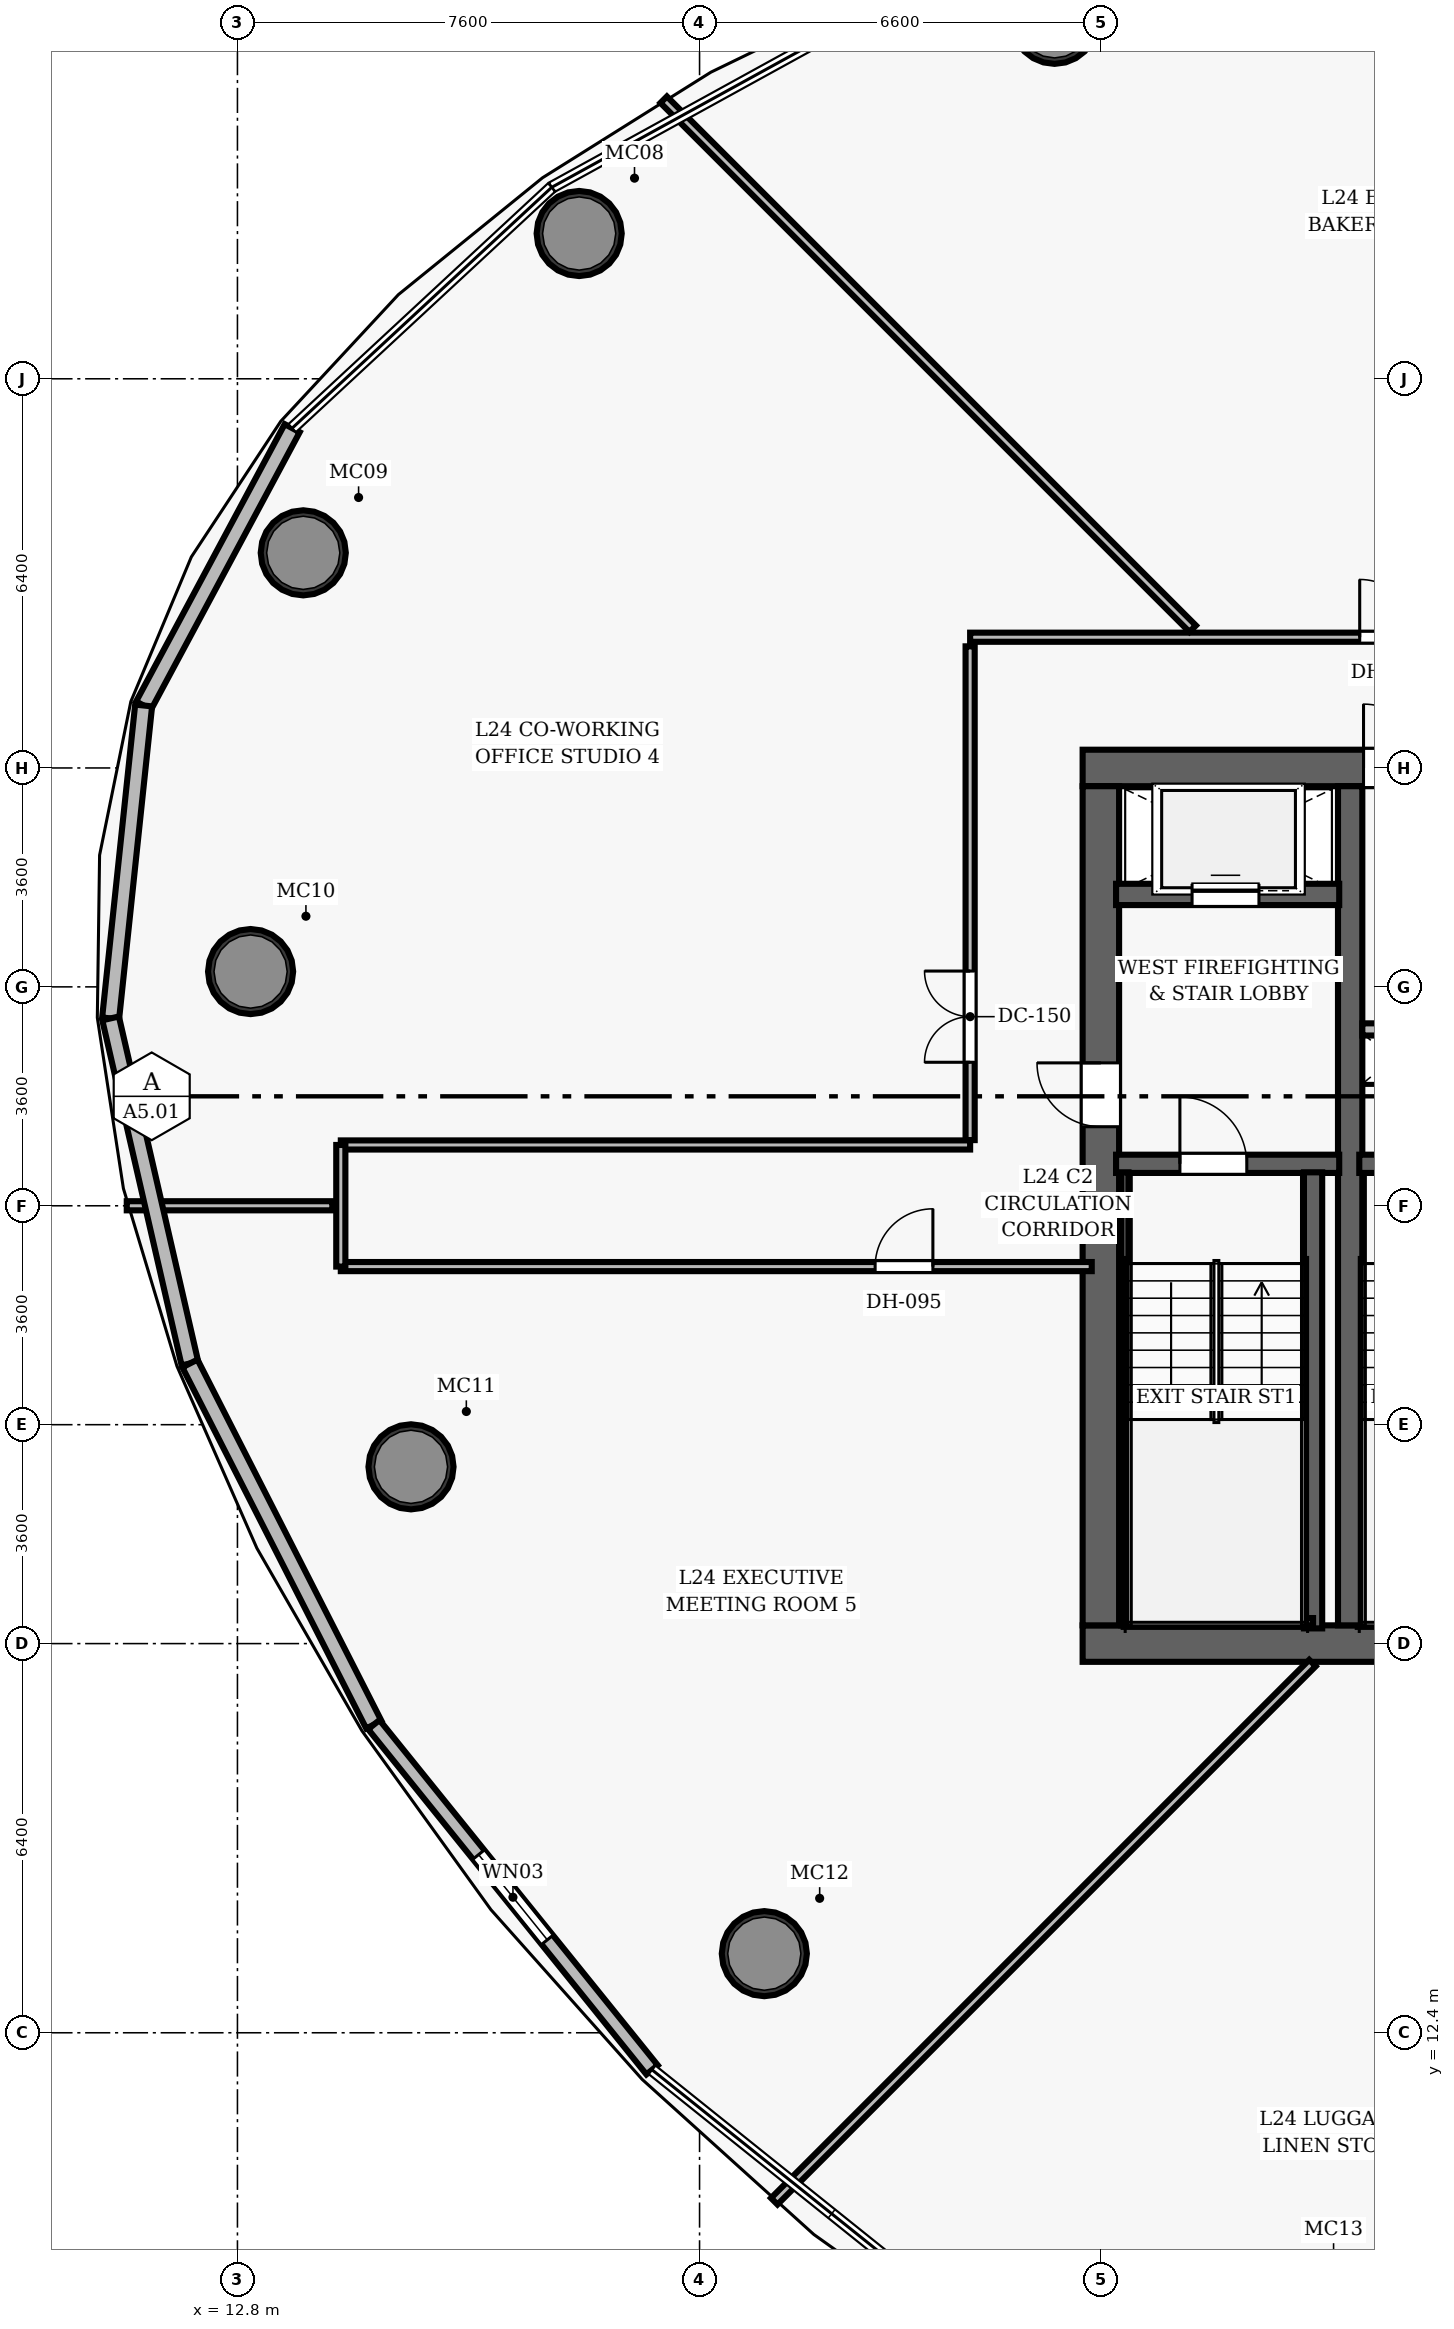
"""IFC4 building model, lengths in metres.
Left out: names, types, materials, properties, quantities, classifications, styles, units other than length and angle.
Written with IfcOpenShell. Run it as: python <this file> out.ifc"""

import sys

from ifc_helpers import new_model, si_unit, direction, frame, frame_2d, origin, origin_2d, place, context, subcontext, project, spatial, rectangle, hollow_circle, extrude, element, fill, save


model = new_model("IFC4")
c1 = context("Model", 3, precision=1e-05, world=origin(), true_north=direction((0.0, 1.0)))
c2 = subcontext(c1, "Body", "Model", "MODEL_VIEW")
j1 = project(units=[si_unit("LENGTHUNIT", "METRE"), si_unit("PLANEANGLEUNIT", "RADIAN")], contexts=[c1])
p1 = place(None, origin())
s1 = spatial("IfcSite", under=j1, at=p1, CompositionType="ELEMENT")
p2 = place(p1, origin())
s2 = spatial("IfcBuilding", under=s1, at=p2, CompositionType="ELEMENT")
p3 = place(p2, frame((0.0, 0.0, 102.8)))
s3 = spatial("IfcBuildingStorey", under=s2, at=p3, CompositionType="ELEMENT", Elevation=102.8)
p4 = place(p3, frame((26.7, 18.8, 0.0), z_axis=(0.0, 0.0, 1.0), x_axis=(1.0, 0.0, 0.0)))
e1 = element("IfcWall", 1, at=p4, inside=s3, PredefinedType="SHEAR", context=c2, shape_type="SweptSolid", body=[
    extrude(rectangle(XDim=22.6, YDim=0.6, at=frame_2d((11.3, 0.0))), origin(), (0.0, 0.0, 1.0), 3.5),
])
p5 = place(p4, frame((14.52, 0.0, 0.0)))
e2 = element("IfcOpeningElement", 2, at=p5, cuts=e1, PredefinedType="OPENING", context=c2, shape_type="SweptSolid", body=[
    extrude(rectangle(XDim=1.05, YDim=2.15, at=frame_2d((0.525, 1.075))), frame((0.0, 0.31, 0.0), z_axis=(0.0, -1.0, 0.0), x_axis=(1.0, 0.0, 0.0)), (0.0, 0.0, 1.0), 0.62),
])
p6 = place(p3, frame((26.7, 33.2, 0.0), z_axis=(0.0, 0.0, 1.0), x_axis=(1.0, 0.0, 0.0)))
e3 = element("IfcWall", 3, at=p6, inside=s3, PredefinedType="SHEAR", context=c2, shape_type="SweptSolid", body=[
    extrude(rectangle(XDim=22.6, YDim=0.6, at=frame_2d((11.3, 0.0))), origin(), (0.0, 0.0, 1.0), 3.5),
])
p7 = place(p6, frame((4.62, 0.0, 0.0)))
e4 = element("IfcOpeningElement", 4, at=p7, cuts=e3, PredefinedType="OPENING", context=c2, shape_type="SweptSolid", body=[
    extrude(rectangle(XDim=1.05, YDim=2.15, at=frame_2d((0.525, 1.075))), frame((0.0, 0.31, 0.0), z_axis=(0.0, -1.0, 0.0), x_axis=(1.0, 0.0, 0.0)), (0.0, 0.0, 1.0), 0.62),
])
p8 = place(p6, frame((14.52, 0.0, 0.0)))
e5 = element("IfcOpeningElement", 5, at=p8, cuts=e3, PredefinedType="OPENING", context=c2, shape_type="SweptSolid", body=[
    extrude(rectangle(XDim=1.05, YDim=2.15, at=frame_2d((0.525, 1.075))), frame((0.0, 0.31, 0.0), z_axis=(0.0, -1.0, 0.0), x_axis=(1.0, 0.0, 0.0)), (0.0, 0.0, 1.0), 0.62),
])
p9 = place(p3, frame((27.0, 19.1, 0.0), z_axis=(0.0, 0.0, 1.0), x_axis=(0.0, 1.0, 0.0)))
e6 = element("IfcWall", 6, at=p9, inside=s3, PredefinedType="SHEAR", context=c2, shape_type="SweptSolid", body=[
    extrude(rectangle(XDim=13.8, YDim=0.6, at=frame_2d((6.9, 0.0))), origin(), (0.0, 0.0, 1.0), 3.5),
])
p10 = place(p9, frame((8.2, 0.0, 0.0)))
e7 = element("IfcOpeningElement", 7, at=p10, cuts=e6, PredefinedType="OPENING", context=c2, shape_type="SweptSolid", body=[
    extrude(rectangle(XDim=1.05, YDim=2.15, at=frame_2d((0.525, 1.075))), frame((0.0, 0.31, 0.0), z_axis=(0.0, -1.0, 0.0), x_axis=(1.0, 0.0, 0.0)), (0.0, 0.0, 1.0), 0.62),
])
p11 = place(p3, frame((31.1, 19.1, 0.0), z_axis=(0.0, 0.0, 1.0), x_axis=(0.0, 1.0, 0.0)))
e8 = element("IfcWall", 8, at=p11, inside=s3, PredefinedType="SHEAR", context=c2, shape_type="SweptSolid", body=[
    extrude(rectangle(XDim=13.8, YDim=0.4, at=frame_2d((6.9, 0.0))), origin(), (0.0, 0.0, 1.0), 3.5),
])
for number, where, z_axis, x_axis in (
    (9, (26.238, 45.479, 0.0), (0.0, 0.0, 1.0), (1.0, 0.0, 0.0)),
    (10, (18.42, 41.989, 0.0), (0.0, 0.0, 1.0), (1.0, 0.0, 0.0)),
    (11, (13.882, 36.738, 0.0), (0.0, 0.0, 1.0), (1.0, 0.0, 0.0)),
    (12, (13.016, 29.852, 0.0), (0.0, 0.0, 1.0), (1.0, 0.0, 0.0)),
    (13, (15.654, 21.707, 0.0), (0.0, 0.0, 1.0), (1.0, 0.0, 0.0)),
    (14, (21.465, 13.701, 0.0), (0.0, 0.0, 1.0), (1.0, 0.0, 0.0)),
):
    element("IfcColumn", number, at=place(p3, frame(where, z_axis=z_axis, x_axis=x_axis)), inside=s3, PredefinedType="COLUMN", context=c2, shape_type="SweptSolid", body=[
        extrude(hollow_circle(Radius=0.7, WallThickness=0.055, at=origin_2d()), origin(), (0.0, 0.0, 1.0), 3.5),
    ])
p12 = place(p3, frame((27.25, 26.69, 0.0), z_axis=(0.0, 0.0, 1.0), x_axis=(1.0, 0.0, 0.0)))
e15 = element("IfcWall", 15, at=p12, inside=s3, PredefinedType="SHEAR", context=c2, shape_type="SweptSolid", body=[
    extrude(rectangle(XDim=3.67, YDim=0.3, at=frame_2d((1.835, 0.0))), origin(), (0.0, 0.0, 1.0), 3.5),
])
p13 = place(p12, frame((1.05, 0.0, 0.0)))
e16 = element("IfcOpeningElement", 16, at=p13, cuts=e15, PredefinedType="OPENING", context=c2, shape_type="SweptSolid", body=[
    extrude(rectangle(XDim=1.1, YDim=2.15, at=frame_2d((0.55, 1.075))), frame((0.0, 0.16, 0.0), z_axis=(0.0, -1.0, 0.0), x_axis=(1.0, 0.0, 0.0)), (0.0, 0.0, 1.0), 0.32),
])
p14 = place(p3, frame((30.49, 19.05, 0.0), z_axis=(0.0, 0.0, 1.0), x_axis=(0.0, 1.0, 0.0)))
e17 = element("IfcWall", 17, at=p14, inside=s3, PredefinedType="SHEAR", context=c2, shape_type="SweptSolid", body=[
    extrude(rectangle(XDim=7.5, YDim=0.3, at=frame_2d((3.75, 0.0))), origin(), (0.0, 0.0, 1.0), 3.5),
])
p15 = place(p3, frame((27.395, 19.1, 0.0), z_axis=(0.0, 0.0, 1.0), x_axis=(0.0, 1.0, 0.0)))
e18 = element("IfcWall", 18, at=p15, inside=s3, PredefinedType="SHEAR", context=c2, shape_type="SweptSolid", body=[
    extrude(rectangle(XDim=7.45, YDim=0.12, at=frame_2d((3.725, 0.0))), origin(), (0.0, 0.0, 1.0), 3.5),
])
p16 = place(p3, frame((27.395, 19.16, 0.0), z_axis=(0.0, 0.0, 1.0), x_axis=(1.0, 0.0, 0.0)))
e19 = element("IfcWall", 19, at=p16, inside=s3, PredefinedType="SHEAR", context=c2, shape_type="SweptSolid", body=[
    extrude(rectangle(XDim=3.095, YDim=0.12, at=frame_2d((1.547, 0.0))), origin(), (0.0, 0.0, 1.0), 3.5),
])
p17 = place(p3, frame((27.25, 31.12, 0.0), z_axis=(0.0, 0.0, 1.0), x_axis=(1.0, 0.0, 0.0)))
e20 = element("IfcWall", 20, at=p17, inside=s3, PredefinedType="SHEAR", context=c2, shape_type="SweptSolid", body=[
    extrude(rectangle(XDim=3.67, YDim=0.35, at=frame_2d((1.835, 0.0))), origin(), (0.0, 0.0, 1.0), 2.675),
])
p18 = place(p17, frame((1.25, 0.0, 0.0)))
e21 = element("IfcOpeningElement", 21, at=p18, cuts=e20, PredefinedType="OPENING", context=c2, shape_type="SweptSolid", body=[
    extrude(rectangle(XDim=1.1, YDim=2.15, at=frame_2d((0.55, 1.075))), frame((0.0, 0.185, 0.0), z_axis=(0.0, -1.0, 0.0), x_axis=(1.0, 0.0, 0.0)), (0.0, 0.0, 1.0), 0.37),
])
p19 = place(p3, frame((31.25, 26.69, 0.0), z_axis=(0.0, 0.0, 1.0), x_axis=(1.0, 0.0, 0.0)))
e22 = element("IfcWall", 22, at=p19, inside=s3, PredefinedType="SHEAR", context=c2, shape_type="SweptSolid", body=[
    extrude(rectangle(XDim=3.56, YDim=0.3, at=frame_2d((1.78, 0.0))), origin(), (0.0, 0.0, 1.0), 3.5),
])
p20 = place(p19, frame((1.55, 0.0, 0.0)))
e23 = element("IfcOpeningElement", 23, at=p20, cuts=e22, PredefinedType="OPENING", context=c2, shape_type="SweptSolid", body=[
    extrude(rectangle(XDim=1.1, YDim=2.15, at=frame_2d((0.55, 1.075))), frame((0.0, 0.16, 0.0), z_axis=(0.0, -1.0, 0.0), x_axis=(1.0, 0.0, 0.0)), (0.0, 0.0, 1.0), 0.32),
])
p21 = place(p3, frame((31.3, 19.16, 0.0), z_axis=(0.0, 0.0, 1.0), x_axis=(1.0, 0.0, 0.0)))
e24 = element("IfcWall", 24, at=p21, inside=s3, PredefinedType="SHEAR", context=c2, shape_type="SweptSolid", body=[
    extrude(rectangle(XDim=3.04, YDim=0.12, at=frame_2d((1.52, 0.0))), origin(), (0.0, 0.0, 1.0), 3.5),
])
p22 = place(p3, frame((31.3, 28.9, 0.0), z_axis=(0.0, 0.0, 1.0), x_axis=(1.0, 0.0, 0.0)))
e25 = element("IfcWall", 25, at=p22, inside=s3, PredefinedType="PARTITIONING", context=c2, shape_type="SweptSolid", body=[
    extrude(rectangle(XDim=1.12, YDim=0.2, at=frame_2d((0.56, 0.0))), origin(), (0.0, 0.0, 1.0), 2.675),
])
p23 = place(p3, frame((24.85, 35.35, 0.0), z_axis=(0.0, 0.0, 1.0), x_axis=(1.0, 0.0, 0.0)))
e26 = element("IfcWall", 26, at=p23, inside=s3, PredefinedType="PARTITIONING", context=c2, shape_type="SweptSolid", body=[
    extrude(rectangle(XDim=26.0, YDim=0.15, at=frame_2d((13.0, 0.0))), origin(), (0.0, 0.0, 1.0), 2.675),
])
p24 = place(p23, frame((14.628, 0.0, 0.0)))
e27 = element("IfcOpeningElement", 27, at=p24, cuts=e26, PredefinedType="OPENING", context=c2, shape_type="SweptSolid", body=[
    extrude(rectangle(XDim=1.5, YDim=2.2, at=frame_2d((0.75, 1.1))), frame((0.0, 0.085, 0.0), z_axis=(0.0, -1.0, 0.0), x_axis=(1.0, 0.0, 0.0)), (0.0, 0.0, 1.0), 0.17),
])
p25 = place(p23, frame((6.407, 0.0, 0.0)))
e28 = element("IfcOpeningElement", 28, at=p25, cuts=e26, PredefinedType="OPENING", context=c2, shape_type="SweptSolid", body=[
    extrude(rectangle(XDim=0.95, YDim=2.15, at=frame_2d((0.475, 1.075))), frame((0.0, 0.085, 0.0), z_axis=(0.0, -1.0, 0.0), x_axis=(1.0, 0.0, 0.0)), (0.0, 0.0, 1.0), 0.17),
])
p26 = place(p3, frame((24.85, 27.08, 0.0), z_axis=(0.0, 0.0, 1.0), x_axis=(0.0, 1.0, 0.0)))
e29 = element("IfcWall", 29, at=p26, inside=s3, PredefinedType="PARTITIONING", context=c2, shape_type="SweptSolid", body=[
    extrude(rectangle(XDim=8.12, YDim=0.15, at=frame_2d((4.06, 0.0))), origin(), (0.0, 0.0, 1.0), 2.675),
])
p27 = place(p26, frame((1.28, 0.0, 0.0)))
e30 = element("IfcOpeningElement", 30, at=p27, cuts=e29, PredefinedType="OPENING", context=c2, shape_type="SweptSolid", body=[
    extrude(rectangle(XDim=1.5, YDim=2.2, at=frame_2d((0.75, 1.1))), frame((0.0, 0.085, 0.0), z_axis=(0.0, -1.0, 0.0), x_axis=(1.0, 0.0, 0.0)), (0.0, 0.0, 1.0), 0.17),
])
p28 = place(p3, frame((14.5, 27.0, 0.0), z_axis=(0.0, 0.0, 1.0), x_axis=(1.0, 0.0, 0.0)))
e31 = element("IfcWall", 31, at=p28, inside=s3, PredefinedType="PARTITIONING", context=c2, shape_type="SweptSolid", body=[
    extrude(rectangle(XDim=10.35, YDim=0.15, at=frame_2d((5.175, 0.0))), origin(), (0.0, 0.0, 1.0), 2.675),
])
p29 = place(p3, frame((14.5, 25.0, 0.0), z_axis=(0.0, 0.0, 1.0), x_axis=(1.0, 0.0, 0.0)))
e32 = element("IfcWall", 32, at=p29, inside=s3, PredefinedType="PARTITIONING", context=c2, shape_type="SweptSolid", body=[
    extrude(rectangle(XDim=12.35, YDim=0.15, at=frame_2d((6.175, 0.0))), origin(), (0.0, 0.0, 1.0), 2.675),
])
p30 = place(p29, frame((8.788, 0.0, 0.0)))
e33 = element("IfcOpeningElement", 33, at=p30, cuts=e32, PredefinedType="OPENING", context=c2, shape_type="SweptSolid", body=[
    extrude(rectangle(XDim=0.95, YDim=2.15, at=frame_2d((0.475, 1.075))), frame((0.0, 0.085, 0.0), z_axis=(0.0, -1.0, 0.0), x_axis=(1.0, 0.0, 0.0)), (0.0, 0.0, 1.0), 0.17),
])
p31 = place(p3, frame((14.5, 25.0, 0.0), z_axis=(0.0, 0.0, 1.0), x_axis=(0.0, 1.0, 0.0)))
e34 = element("IfcWall", 34, at=p31, inside=s3, PredefinedType="PARTITIONING", context=c2, shape_type="SweptSolid", body=[
    extrude(rectangle(XDim=2.0, YDim=0.15, at=frame_2d((1.0, 0.0))), origin(), (0.0, 0.0, 1.0), 2.675),
])
p32 = place(p3, frame((28.51, 35.49, 0.0), z_axis=(0.0, 0.0, 1.0), x_axis=(-0.707106781187, 0.707106781187, 0.0)))
e35 = element("IfcWall", 35, at=p32, inside=s3, PredefinedType="PARTITIONING", context=c2, shape_type="SweptSolid", body=[
    extrude(rectangle(XDim=12.304, YDim=0.15, at=frame_2d((6.152, 0.0))), origin(), (0.0, 0.0, 1.0), 2.675),
])
p33 = place(p3, frame((14.36, 26.0, 0.0), z_axis=(0.0, 0.0, 1.0), x_axis=(-1.0, 0.0, 0.0)))
e36 = element("IfcWall", 36, at=p33, inside=s3, PredefinedType="PARTITIONING", context=c2, shape_type="SweptSolid", body=[
    extrude(rectangle(XDim=3.381, YDim=0.15, at=frame_2d((1.69, 0.0))), origin(), (0.0, 0.0, 1.0), 2.675),
])
p34 = place(p3, frame((30.48, 18.48, 0.0), z_axis=(0.0, 0.0, 1.0), x_axis=(-0.707106781187, -0.707106781187, 0.0)))
e37 = element("IfcWall", 37, at=p34, inside=s3, PredefinedType="PARTITIONING", context=c2, shape_type="SweptSolid", body=[
    extrude(rectangle(XDim=12.518, YDim=0.15, at=frame_2d((6.259, 0.0))), origin(), (0.0, 0.0, 1.0), 2.675),
])
for number, where, z_axis, x_axis in (
    (38, (11.257, 34.227, 0.0), (0.0, 0.0, 1.0), (0.472, 0.881, 0.0)),
    (39, (10.714, 29.082, 0.0), (0.0, 0.0, 1.0), (0.105, 0.994, 0.0)),
):
    element("IfcWall", number, at=place(p3, frame(where, z_axis=z_axis, x_axis=x_axis)), inside=s3, PredefinedType="SOLIDWALL", context=c2, shape_type="SweptSolid", body=[
        extrude(rectangle(XDim=5.174, YDim=0.28, at=frame_2d((2.587, 0.0))), origin(), (0.0, 0.0, 1.0), 3.26),
    ])
p35 = place(p3, frame((12.018, 23.406, 0.0), z_axis=(0.0, 0.0, 1.0), x_axis=(-0.223974469887, 0.974595011704, 0.0)))
e40 = element("IfcWall", 40, at=p35, inside=s3, PredefinedType="SOLIDWALL", context=c2, shape_type="SweptSolid", body=[
    extrude(rectangle(XDim=5.823, YDim=0.28, at=frame_2d((2.912, 0.0))), origin(), (0.0, 0.0, 1.0), 3.26),
])
p36 = place(p3, frame((15.043, 17.467, 0.0), z_axis=(0.0, 0.0, 1.0), x_axis=(-0.45378036064, 0.891113564198, 0.0)))
e41 = element("IfcWall", 41, at=p36, inside=s3, PredefinedType="SOLIDWALL", context=c2, shape_type="SweptSolid", body=[
    extrude(rectangle(XDim=6.665, YDim=0.28, at=frame_2d((3.333, 0.0))), origin(), (0.0, 0.0, 1.0), 3.26),
])
p37 = place(p3, frame((19.619, 11.791, 0.0), z_axis=(0.0, 0.0, 1.0), x_axis=(-0.627638574616, 0.778504861676, 0.0)))
e42 = element("IfcWall", 42, at=p37, inside=s3, PredefinedType="SOLIDWALL", context=c2, shape_type="SweptSolid", body=[
    extrude(rectangle(XDim=7.292, YDim=0.24, at=frame_2d((3.646, 0.0))), origin(), (0.0, 0.0, 1.0), 3.26),
])
p38 = place(p37, frame((2.746, 0.0, 0.85)))
e43 = element("IfcOpeningElement", 43, at=p38, cuts=e42, PredefinedType="OPENING", context=c2, shape_type="SweptSolid", body=[
    extrude(rectangle(XDim=1.8, YDim=1.8, at=frame_2d((0.9, 0.9))), frame((0.0, 0.13, 0.0), z_axis=(0.0, -1.0, 0.0), x_axis=(1.0, 0.0, 0.0)), (0.0, 0.0, 1.0), 0.26),
])
p39 = place(p13, origin())
e44 = element("IfcDoor", 44, at=p39, inside=s3, OperationType="SINGLE_SWING_LEFT", PredefinedType="DOOR", context=c2, shape_type="SweptSolid", body=[
    extrude(rectangle(XDim=1.1, YDim=2.15, at=frame_2d((0.55, 1.075))), frame((0.0, 0.025, 0.0), z_axis=(0.0, -1.0, 0.0), x_axis=(1.0, 0.0, 0.0)), (0.0, 0.0, 1.0), 0.05),
])
fill(e16, e44)
p40 = place(p10, origin())
e45 = element("IfcDoor", 45, at=p40, inside=s3, OperationType="SINGLE_SWING_RIGHT", PredefinedType="DOOR", context=c2, shape_type="SweptSolid", body=[
    extrude(rectangle(XDim=1.05, YDim=2.15, at=frame_2d((0.525, 1.075))), frame((0.0, 0.025, 0.0), z_axis=(0.0, -1.0, 0.0), x_axis=(1.0, 0.0, 0.0)), (0.0, 0.0, 1.0), 0.05),
])
fill(e7, e45)
p41 = place(p7, origin())
e46 = element("IfcDoor", 46, at=p41, inside=s3, OperationType="SINGLE_SWING_LEFT", PredefinedType="DOOR", context=c2, shape_type="SweptSolid", body=[
    extrude(rectangle(XDim=1.05, YDim=2.15, at=frame_2d((0.525, 1.075))), frame((0.0, 0.025, 0.0), z_axis=(0.0, -1.0, 0.0), x_axis=(1.0, 0.0, 0.0)), (0.0, 0.0, 1.0), 0.05),
])
fill(e4, e46)
p42 = place(p25, origin())
e47 = element("IfcDoor", 47, at=p42, inside=s3, OperationType="SINGLE_SWING_LEFT", PredefinedType="DOOR", context=c2, shape_type="SweptSolid", body=[
    extrude(rectangle(XDim=0.95, YDim=2.15, at=frame_2d((0.475, 1.075))), frame((0.0, 0.025, 0.0), z_axis=(0.0, -1.0, 0.0), x_axis=(1.0, 0.0, 0.0)), (0.0, 0.0, 1.0), 0.05),
])
fill(e28, e47)
p43 = place(p27, origin())
e48 = element("IfcDoor", 48, at=p43, inside=s3, OperationType="DOUBLE_DOOR_SINGLE_SWING", PredefinedType="DOOR", context=c2, shape_type="SweptSolid", body=[
    extrude(rectangle(XDim=1.5, YDim=2.2, at=frame_2d((0.75, 1.1))), frame((0.0, 0.025, 0.0), z_axis=(0.0, -1.0, 0.0), x_axis=(1.0, 0.0, 0.0)), (0.0, 0.0, 1.0), 0.05),
])
fill(e30, e48)
p44 = place(p30, origin())
e49 = element("IfcDoor", 49, at=p44, inside=s3, OperationType="SINGLE_SWING_RIGHT", PredefinedType="DOOR", context=c2, shape_type="SweptSolid", body=[
    extrude(rectangle(XDim=0.95, YDim=2.15, at=frame_2d((0.475, 1.075))), frame((0.0, 0.025, 0.0), z_axis=(0.0, -1.0, 0.0), x_axis=(1.0, 0.0, 0.0)), (0.0, 0.0, 1.0), 0.05),
])
fill(e33, e49)
p45 = place(p18, origin())
e50 = element("IfcDoor", 50, at=p45, inside=s3, OperationType="SLIDING_TO_LEFT", PredefinedType="DOOR", context=c2, shape_type="SweptSolid", body=[
    extrude(rectangle(XDim=1.1, YDim=2.15, at=frame_2d((0.55, 1.075))), frame((0.0, 0.025, 0.0), z_axis=(0.0, -1.0, 0.0), x_axis=(1.0, 0.0, 0.0)), (0.0, 0.0, 1.0), 0.05),
])
fill(e21, e50)
p46 = place(p38, origin())
e51 = element("IfcWindow", 51, at=p46, inside=s3, PartitioningType="SINGLE_PANEL", PredefinedType="WINDOW", context=c2, shape_type="SweptSolid", body=[
    extrude(rectangle(XDim=1.8, YDim=1.8, at=frame_2d((0.9, 0.9))), frame((0.0, 0.03, 0.0), z_axis=(0.0, -1.0, 0.0), x_axis=(1.0, 0.0, 0.0)), (0.0, 0.0, 1.0), 0.06),
])
fill(e43, e51)
save(model, sys.argv[1])
